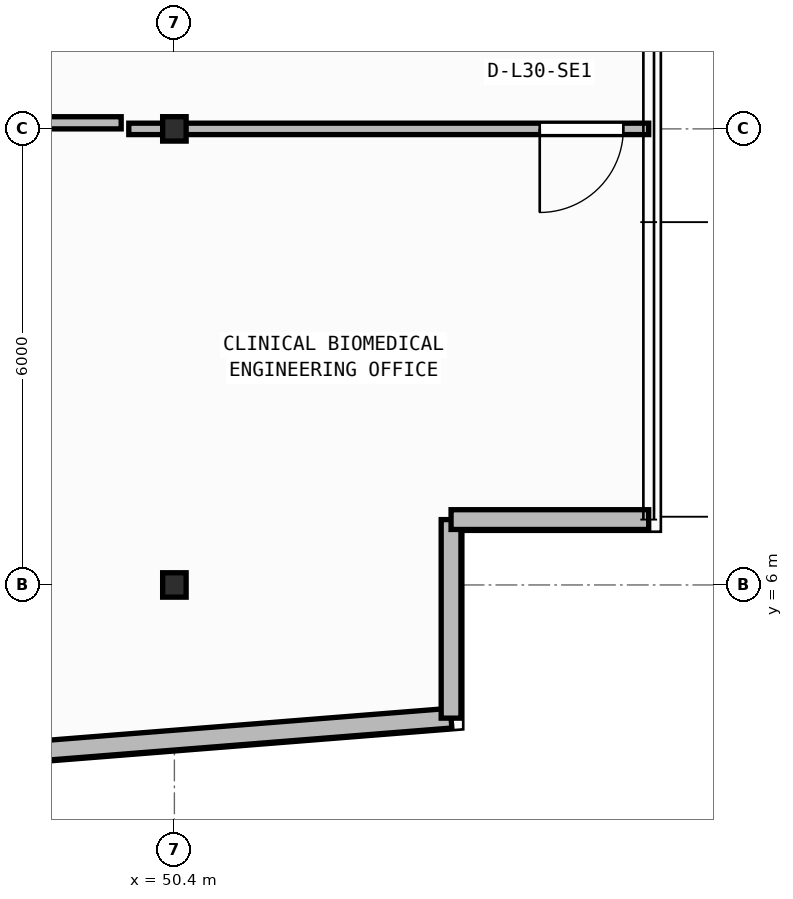
"""IFC4 building model, lengths in metres.
Left out: names, types, materials, properties, quantities, classifications, styles, units other than length and angle.
Written with IfcOpenShell. Run it as: python <this file> out.ifc"""

import sys

from ifc_helpers import new_model, si_unit, direction, frame, frame_2d, origin, origin_2d, place, context, subcontext, project, spatial, rectangle, i_section, extrude, element, fill, save


model = new_model("IFC4")
c1 = context("Model", 3, precision=1e-05, world=origin(), true_north=direction((0.0, 1.0)))
c2 = subcontext(c1, "Body", "Model", "MODEL_VIEW")
j1 = project(units=[si_unit("LENGTHUNIT", "METRE"), si_unit("PLANEANGLEUNIT", "RADIAN")], contexts=[c1])
p1 = place(None, origin())
s1 = spatial("IfcSite", under=j1, at=p1, CompositionType="ELEMENT")
p2 = place(p1, origin())
s2 = spatial("IfcBuilding", under=s1, at=p2, CompositionType="ELEMENT")
p3 = place(p2, frame((0.0, 0.0, 123.1)))
s3 = spatial("IfcBuildingStorey", under=s2, at=p3, CompositionType="ELEMENT", Elevation=123.1)
for number, where, z_axis, x_axis in (
    (1, (50.4, 6.0, 0.0), (0.0, 0.0, 1.0), (1.0, 0.0, 0.0)),
    (2, (50.4, 12.0, 0.0), (0.0, 0.0, 1.0), (1.0, 0.0, 0.0)),
):
    element("IfcColumn", number, at=place(p3, frame(where, z_axis=z_axis, x_axis=x_axis)), inside=s3, PredefinedType="COLUMN", context=c2, shape_type="SweptSolid", body=[
        extrude(i_section(OverallWidth=0.309, OverallDepth=0.321, WebThickness=0.014, FlangeThickness=0.022, FilletRadius=0.017, at=origin_2d()), origin(), (0.0, 0.0, 1.0), 3.95),
    ])
p4 = place(p3, frame((2.76, 0.173, 0.0), z_axis=(0.0, 0.0, 1.0), x_axis=(0.996857931723, 0.079210251617, 0.0)))
e3 = element("IfcWall", 3, at=p4, inside=s3, PredefinedType="STANDARD", context=c2, shape_type="SweptSolid", body=[
    extrude(rectangle(XDim=51.442, YDim=0.26, at=frame_2d((25.721, 0.0))), origin(), (0.0, 0.0, 1.0), 3.71),
])
p5 = place(p4, frame((24.521, 0.0, 0.9)))
e4 = element("IfcOpeningElement", 4, at=p5, cuts=e3, PredefinedType="OPENING", context=c2, shape_type="SweptSolid", body=[
    extrude(rectangle(XDim=2.4, YDim=1.65, at=frame_2d((1.2, 0.825))), frame((0.0, 0.14, 0.0), z_axis=(0.0, -1.0, 0.0), x_axis=(1.0, 0.0, 0.0)), (0.0, 0.0, 1.0), 0.28),
])
p6 = place(p3, frame((54.04, 4.248, 0.0), z_axis=(0.0, 0.0, 1.0), x_axis=(0.0, 1.0, 0.0)))
e5 = element("IfcWall", 5, at=p6, inside=s3, PredefinedType="STANDARD", context=c2, shape_type="SweptSolid", body=[
    extrude(rectangle(XDim=2.612, YDim=0.26, at=frame_2d((1.306, 0.0))), origin(), (0.0, 0.0, 1.0), 3.71),
])
p7 = place(p3, frame((54.04, 6.86, 0.0), z_axis=(0.0, 0.0, 1.0), x_axis=(1.0, 0.0, 0.0)))
e6 = element("IfcWall", 6, at=p7, inside=s3, PredefinedType="STANDARD", context=c2, shape_type="SweptSolid", body=[
    extrude(rectangle(XDim=2.6, YDim=0.26, at=frame_2d((1.3, 0.0))), origin(), (0.0, 0.0, 1.0), 3.71),
])
p8 = place(p3, frame((56.64, 12.0, 0.0), z_axis=(0.0, 0.0, 1.0), x_axis=(-1.0, 0.0, 0.0)))
e7 = element("IfcWall", 7, at=p8, inside=s3, PredefinedType="PARTITIONING", context=c2, shape_type="SweptSolid", body=[
    extrude(rectangle(XDim=6.84, YDim=0.15, at=frame_2d((3.42, 0.0))), origin(), (0.0, 0.0, 1.0), 3.083),
])
p9 = place(p8, frame((0.333, 0.0, 0.0)))
e8 = element("IfcOpeningElement", 8, at=p9, cuts=e7, PredefinedType="OPENING", context=c2, shape_type="SweptSolid", body=[
    extrude(rectangle(XDim=1.1, YDim=2.1, at=frame_2d((0.55, 1.05))), frame((0.0, 0.085, 0.0), z_axis=(0.0, -1.0, 0.0), x_axis=(1.0, 0.0, 0.0)), (0.0, 0.0, 1.0), 0.17),
])
p10 = place(p3, frame((46.689, 12.08, 0.0), z_axis=(0.0, 0.0, 1.0), x_axis=(1.0, 0.0, 0.0)))
e9 = element("IfcWall", 9, at=p10, inside=s3, PredefinedType="PARTITIONING", context=c2, shape_type="SweptSolid", body=[
    extrude(rectangle(XDim=3.011, YDim=0.16, at=frame_2d((1.505, 0.0))), origin(), (0.0, 0.0, 1.0), 3.083),
])
p11 = place(p9, origin())
e10 = element("IfcDoor", 10, at=p11, inside=s3, OperationType="SINGLE_SWING_RIGHT", PredefinedType="DOOR", context=c2, shape_type="SweptSolid", body=[
    extrude(rectangle(XDim=1.1, YDim=2.1, at=frame_2d((0.55, 1.05))), frame((0.0, 0.025, 0.0), z_axis=(0.0, -1.0, 0.0), x_axis=(1.0, 0.0, 0.0)), (0.0, 0.0, 1.0), 0.05),
])
fill(e8, e10)
save(model, sys.argv[1])
